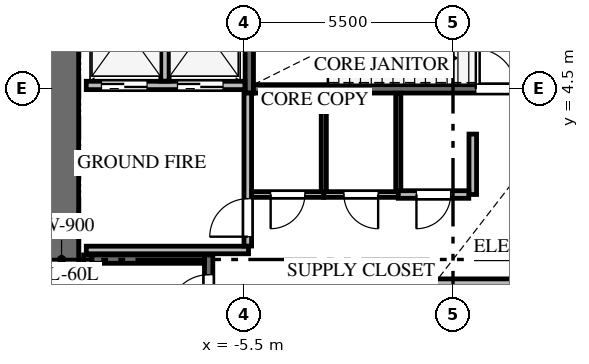
"""IFC4 building model, lengths in metres.
Left out: names, types, materials, properties, quantities, classifications, styles, units other than length and angle.
Written with IfcOpenShell. Run it as: python <this file> out.ifc"""

import sys

from ifc_helpers import new_model, si_unit, direction, frame, frame_2d, origin, place, context, subcontext, project, spatial, rectangle, extrude, source, transform, mapped, element, fill, save


model = new_model("IFC4")
c1 = context("Model", 3, precision=1e-05, world=origin(), true_north=direction((0.0, 1.0)))
c2 = subcontext(c1, "Body", "Model", "MODEL_VIEW")
j1 = project(units=[si_unit("LENGTHUNIT", "METRE"), si_unit("PLANEANGLEUNIT", "RADIAN")], contexts=[c1])
p1 = place(None, origin())
s1 = spatial("IfcSite", under=j1, at=p1, CompositionType="ELEMENT")
p2 = place(p1, origin())
s2 = spatial("IfcBuilding", under=s1, at=p2, CompositionType="ELEMENT")
p3 = place(p2, origin())
s3 = spatial("IfcBuildingStorey", under=s2, at=p3, CompositionType="ELEMENT", Elevation=0.0)
p4 = place(p3, frame((-10.3, -8.75, 0.0), z_axis=(0.0, 0.0, 1.0), x_axis=(0.0, 1.0, 0.0)))
e1 = element("IfcWall", 1, at=p4, inside=s3, PredefinedType="SHEAR", context=c2, shape_type="SweptSolid", body=[
    extrude(rectangle(XDim=17.5, YDim=0.9, at=frame_2d((8.75, 0.0))), origin(), (0.0, 0.0, 1.0), 5.2),
])
p5 = place(p3, frame((-6.43, -7.77, -0.3), z_axis=(0.0, 0.0, 1.0), x_axis=(0.0, 1.0, 0.0)))
e2 = element("IfcWall", 2, at=p5, inside=s3, PredefinedType="SHEAR", context=c2, shape_type="SweptSolid", body=[
    extrude(rectangle(XDim=7.89, YDim=0.22, at=frame_2d((3.945, 0.0))), origin(), (0.0, 0.0, 1.0), 5.2),
])
p6 = place(p5, frame((6.32, 0.0, 0.0)))
e3 = element("IfcOpeningElement", 3, at=p6, cuts=e2, PredefinedType="OPENING", context=c2, shape_type="SweptSolid", body=[
    extrude(rectangle(XDim=1.05, YDim=2.15, at=frame_2d((0.525, 1.075))), frame((0.0, 0.12, 0.0), z_axis=(0.0, -1.0, 0.0), x_axis=(1.0, 0.0, 0.0)), (0.0, 0.0, 1.0), 0.24),
])
p7 = place(p3, frame((-9.61, 0.12, -0.3), z_axis=(0.0, 0.0, 1.0), x_axis=(0.0, -1.0, 0.0)))
e4 = element("IfcWall", 4, at=p7, inside=s3, PredefinedType="SHEAR", context=c2, shape_type="SweptSolid", body=[
    extrude(rectangle(XDim=7.89, YDim=0.22, at=frame_2d((3.945, 0.0))), origin(), (0.0, 0.0, 1.0), 5.2),
])
p8 = place(p3, frame((-6.54, 0.01, -0.3), z_axis=(0.0, 0.0, 1.0), x_axis=(-1.0, 0.0, 0.0)))
e5 = element("IfcWall", 5, at=p8, inside=s3, PredefinedType="SHEAR", context=c2, shape_type="SweptSolid", body=[
    extrude(rectangle(XDim=2.96, YDim=0.22, at=frame_2d((1.48, 0.0))), origin(), (0.0, 0.0, 1.0), 5.2),
])
p9 = place(p3, frame((-5.36, 7.78, -0.3), z_axis=(0.0, 0.0, 1.0), x_axis=(0.0, -1.0, 0.0)))
e6 = element("IfcWall", 6, at=p9, inside=s3, PredefinedType="SHEAR", context=c2, shape_type="SweptSolid", body=[
    extrude(rectangle(XDim=3.4, YDim=0.22, at=frame_2d((1.7, 0.0))), origin(), (0.0, 0.0, 1.0), 5.2),
])
p10 = place(p3, frame((-5.25, 4.49, -0.3), z_axis=(0.0, 0.0, 1.0), x_axis=(1.0, 0.0, 0.0)))
e7 = element("IfcWall", 7, at=p10, inside=s3, PredefinedType="SHEAR", context=c2, shape_type="SweptSolid", body=[
    extrude(rectangle(XDim=7.35, YDim=0.22, at=frame_2d((3.675, 0.0))), origin(), (0.0, 0.0, 1.0), 5.2),
])
p11 = place(p10, frame((5.85, 0.0, 0.0)))
e8 = element("IfcOpeningElement", 8, at=p11, cuts=e7, PredefinedType="OPENING", context=c2, shape_type="SweptSolid", body=[
    extrude(rectangle(XDim=1.05, YDim=2.15, at=frame_2d((0.525, 1.075))), frame((0.0, 0.12, 0.0), z_axis=(0.0, -1.0, 0.0), x_axis=(1.0, 0.0, 0.0)), (0.0, 0.0, 1.0), 0.24),
])
p12 = place(p3, frame((-20.589, 1.538, 0.0), z_axis=(0.0, 0.0, 1.0), x_axis=(0.603015201292, 0.797729695455, 0.0)))
e9 = element("IfcWall", 9, at=p12, inside=s3, PredefinedType="SOLIDWALL", context=c2, shape_type="SweptSolid", body=[
    extrude(rectangle(XDim=16.65, YDim=0.3, at=frame_2d((8.325, 0.0))), origin(), (0.0, 0.0, 1.0), 4.9),
])
p13 = place(p12, frame((2.0, 0.0, 0.0)))
e10 = element("IfcOpeningElement", 10, at=p13, cuts=e9, PredefinedType="OPENING", context=c2, shape_type="SweptSolid", body=[
    extrude(rectangle(XDim=1.05, YDim=2.2, at=frame_2d((0.525, 1.1))), frame((0.0, 0.16, 0.0), z_axis=(0.0, -1.0, 0.0), x_axis=(1.0, 0.0, 0.0)), (0.0, 0.0, 1.0), 0.32),
])
p14 = place(p3, frame((-9.65, 4.58, 0.0), z_axis=(0.0, 0.0, 1.0), x_axis=(1.0, 0.0, 0.0)))
e11 = element("IfcWall", 11, at=p14, inside=s3, PredefinedType="SOLIDWALL", context=c2, shape_type="SweptSolid", body=[
    extrude(rectangle(XDim=4.175, YDim=0.22, at=frame_2d((2.087, 0.0))), origin(), (0.0, 0.0, 1.0), 4.885),
])
p15 = place(p14, frame((0.4, 0.0, 0.0)))
e12 = element("IfcOpeningElement", 12, at=p15, cuts=e11, PredefinedType="OPENING", context=c2, shape_type="SweptSolid", body=[
    extrude(rectangle(XDim=1.2, YDim=2.15, at=frame_2d((0.6, 1.075))), frame((0.0, 0.12, 0.0), z_axis=(0.0, -1.0, 0.0), x_axis=(1.0, 0.0, 0.0)), (0.0, 0.0, 1.0), 0.24),
])
p16 = place(p14, frame((2.4, 0.0, 0.0)))
e13 = element("IfcOpeningElement", 13, at=p16, cuts=e11, PredefinedType="OPENING", context=c2, shape_type="SweptSolid", body=[
    extrude(rectangle(XDim=1.2, YDim=2.15, at=frame_2d((0.6, 1.075))), frame((0.0, 0.12, 0.0), z_axis=(0.0, -1.0, 0.0), x_axis=(1.0, 0.0, 0.0)), (0.0, 0.0, 1.0), 0.24),
])
p17 = place(p3, frame((-7.58, 4.694, 0.0), z_axis=(0.0, 0.0, 1.0), x_axis=(0.0, 1.0, 0.0)))
e14 = element("IfcWall", 14, at=p17, inside=s3, PredefinedType="SOLIDWALL", context=c2, shape_type="SweptSolid", body=[
    extrude(rectangle(XDim=2.906, YDim=0.22, at=frame_2d((1.453, 0.0))), origin(), (0.0, 0.0, 1.0), 4.885),
])
p18 = place(p3, frame((-9.65, 0.25, 0.0), z_axis=(0.0, 0.0, 1.0), x_axis=(1.0, 0.0, 0.0)))
e15 = element("IfcWall", 15, at=p18, inside=s3, PredefinedType="SOLIDWALL", context=c2, shape_type="SweptSolid", body=[
    extrude(rectangle(XDim=4.27, YDim=0.2, at=frame_2d((2.135, 0.0))), origin(), (0.0, 0.0, 1.0), 4.885),
])
p19 = place(p3, frame((-5.4, 0.354, 0.0), z_axis=(0.0, 0.0, 1.0), x_axis=(0.0, 1.0, 0.0)))
e16 = element("IfcWall", 16, at=p19, inside=s3, PredefinedType="SOLIDWALL", context=c2, shape_type="SweptSolid", body=[
    extrude(rectangle(XDim=4.026, YDim=0.2, at=frame_2d((2.013, 0.0))), origin(), (0.0, 0.0, 1.0), 4.885),
])
p20 = place(p19, frame((0.246, 0.0, 0.0)))
e17 = element("IfcOpeningElement", 17, at=p20, cuts=e16, PredefinedType="OPENING", context=c2, shape_type="SweptSolid", body=[
    extrude(rectangle(XDim=1.0, YDim=2.15, at=frame_2d((0.5, 1.075))), frame((0.0, 0.11, 0.0), z_axis=(0.0, -1.0, 0.0), x_axis=(1.0, 0.0, 0.0)), (0.0, 0.0, 1.0), 0.22),
])
p21 = place(p3, frame((-4.22, -0.62, 0.0), z_axis=(0.0, 0.0, 1.0), x_axis=(1.0, 0.0, 0.0)))
e18 = element("IfcWall", 18, at=p21, inside=s3, PredefinedType="SOLIDWALL", context=c2, shape_type="SweptSolid", body=[
    extrude(rectangle(XDim=7.24, YDim=0.22, at=frame_2d((3.62, 0.0))), origin(), (0.0, 0.0, 1.0), 4.885),
])
p22 = place(p3, frame((-3.4, 1.71, 0.0), z_axis=(0.0, 0.0, 1.0), x_axis=(-1.0, 0.0, 0.0)))
e19 = element("IfcWall", 19, at=p22, inside=s3, PredefinedType="PARTITIONING", context=c2, shape_type="SweptSolid", body=[
    extrude(rectangle(XDim=1.896, YDim=0.15, at=frame_2d((0.948, 0.0))), origin(), (0.0, 0.0, 1.0), 4.885),
])
p23 = place(p22, frame((0.498, 0.0, 0.0)))
e20 = element("IfcOpeningElement", 20, at=p23, cuts=e19, PredefinedType="OPENING", context=c2, shape_type="SweptSolid", body=[
    extrude(rectangle(XDim=0.9, YDim=2.05, at=frame_2d((0.45, 1.025))), frame((0.0, 0.085, 0.0), z_axis=(0.0, -1.0, 0.0), x_axis=(1.0, 0.0, 0.0)), (0.0, 0.0, 1.0), 0.17),
])
p24 = place(p3, frame((-1.44, 1.71, 0.0), z_axis=(0.0, 0.0, 1.0), x_axis=(-1.0, 0.0, 0.0)))
e21 = element("IfcWall", 21, at=p24, inside=s3, PredefinedType="PARTITIONING", context=c2, shape_type="SweptSolid", body=[
    extrude(rectangle(XDim=1.96, YDim=0.15, at=frame_2d((0.98, 0.0))), origin(), (0.0, 0.0, 1.0), 4.885),
])
p25 = place(p24, frame((0.53, 0.0, 0.0)))
e22 = element("IfcOpeningElement", 22, at=p25, cuts=e21, PredefinedType="OPENING", context=c2, shape_type="SweptSolid", body=[
    extrude(rectangle(XDim=0.9, YDim=2.05, at=frame_2d((0.45, 1.025))), frame((0.0, 0.085, 0.0), z_axis=(0.0, -1.0, 0.0), x_axis=(1.0, 0.0, 0.0)), (0.0, 0.0, 1.0), 0.17),
])
p26 = place(p3, frame((0.52, 3.3, 0.0), z_axis=(0.0, 0.0, 1.0), x_axis=(0.0, -1.0, 0.0)))
e23 = element("IfcWall", 23, at=p26, inside=s3, PredefinedType="SOLIDWALL", context=c2, shape_type="SweptSolid", body=[
    extrude(rectangle(XDim=1.59, YDim=0.2, at=frame_2d((0.795, 0.0))), origin(), (0.0, 0.0, 1.0), 4.885),
])
p27 = place(p3, frame((0.416, 1.71, 0.0), z_axis=(0.0, 0.0, 1.0), x_axis=(-1.0, 0.0, 0.0)))
e24 = element("IfcWall", 24, at=p27, inside=s3, PredefinedType="SOLIDWALL", context=c2, shape_type="SweptSolid", body=[
    extrude(rectangle(XDim=1.856, YDim=0.2, at=frame_2d((0.928, 0.0))), origin(), (0.0, 0.0, 1.0), 4.885),
])
p28 = place(p27, frame((0.478, 0.0, 0.0)))
e25 = element("IfcOpeningElement", 25, at=p28, cuts=e24, PredefinedType="OPENING", context=c2, shape_type="SweptSolid", body=[
    extrude(rectangle(XDim=0.9, YDim=2.05, at=frame_2d((0.45, 1.025))), frame((0.0, 0.11, 0.0), z_axis=(0.0, -1.0, 0.0), x_axis=(1.0, 0.0, 0.0)), (0.0, 0.0, 1.0), 0.22),
])
p29 = place(p3, frame((-3.4, 4.375, 0.0), z_axis=(0.0, 0.0, 1.0), x_axis=(0.0, -1.0, 0.0)))
e26 = element("IfcWall", 26, at=p29, inside=s3, PredefinedType="PARTITIONING", context=c2, shape_type="SweptSolid", body=[
    extrude(rectangle(XDim=2.586, YDim=0.135, at=frame_2d((1.293, 0.0))), origin(), (0.0, 0.0, 1.0), 4.885),
])
p30 = place(p3, frame((-1.44, 4.375, 0.0), z_axis=(0.0, 0.0, 1.0), x_axis=(0.0, -1.0, 0.0)))
e27 = element("IfcWall", 27, at=p30, inside=s3, PredefinedType="PARTITIONING", context=c2, shape_type="SweptSolid", body=[
    extrude(rectangle(XDim=2.561, YDim=0.135, at=frame_2d((1.281, 0.0))), origin(), (0.0, 0.0, 1.0), 4.885),
])
m1 = source(origin(), c2, "Body", "SweptSolid", [
    extrude(rectangle(XDim=1.05, YDim=2.15, at=frame_2d((0.525, 1.075))), frame((0.0, 0.025, 0.0), z_axis=(0.0, -1.0, 0.0), x_axis=(1.0, 0.0, 0.0)), (0.0, 0.0, 1.0), 0.05),
])
p31 = place(p6, origin())
e28 = element("IfcDoor", 28, at=p31, inside=s3, OperationType="SINGLE_SWING_LEFT", PredefinedType="DOOR", context=c2, shape_type="MappedRepresentation", body=[
    mapped(m1, transform((0.0, 0.0, 0.0), x_axis=(1.0, 0.0, 0.0), y_axis=(0.0, 1.0, 0.0), z_axis=(0.0, 0.0, 1.0), scale=1.0)),
])
fill(e3, e28)
p32 = place(p11, origin())
e29 = element("IfcDoor", 29, at=p32, inside=s3, OperationType="SINGLE_SWING_LEFT", PredefinedType="DOOR", context=c2, shape_type="MappedRepresentation", body=[
    mapped(m1, transform((0.0, 0.0, 0.0), x_axis=(1.0, 0.0, 0.0), y_axis=(0.0, 1.0, 0.0), z_axis=(0.0, 0.0, 1.0), scale=1.0)),
])
fill(e8, e29)
m2 = source(origin(), c2, "Body", "SweptSolid", [
    extrude(rectangle(XDim=1.2, YDim=2.15, at=frame_2d((0.6, 1.075))), frame((0.0, 0.025, 0.0), z_axis=(0.0, -1.0, 0.0), x_axis=(1.0, 0.0, 0.0)), (0.0, 0.0, 1.0), 0.05),
])
p33 = place(p15, origin())
e30 = element("IfcDoor", 30, at=p33, inside=s3, OperationType="DOUBLE_DOOR_SLIDING", PredefinedType="DOOR", context=c2, shape_type="MappedRepresentation", body=[
    mapped(m2, transform((0.0, 0.0, 0.0), x_axis=(1.0, 0.0, 0.0), y_axis=(0.0, 1.0, 0.0), z_axis=(0.0, 0.0, 1.0), scale=1.0)),
])
fill(e12, e30)
p34 = place(p16, origin())
e31 = element("IfcDoor", 31, at=p34, inside=s3, OperationType="DOUBLE_DOOR_SLIDING", PredefinedType="DOOR", context=c2, shape_type="MappedRepresentation", body=[
    mapped(m2, transform((0.0, 0.0, 0.0), x_axis=(1.0, 0.0, 0.0), y_axis=(0.0, 1.0, 0.0), z_axis=(0.0, 0.0, 1.0), scale=1.0)),
])
fill(e13, e31)
m3 = source(origin(), c2, "Body", "SweptSolid", [
    extrude(rectangle(XDim=1.0, YDim=2.15, at=frame_2d((0.5, 1.075))), frame((0.0, 0.025, 0.0), z_axis=(0.0, -1.0, 0.0), x_axis=(1.0, 0.0, 0.0)), (0.0, 0.0, 1.0), 0.05),
])
p35 = place(p20, origin())
e32 = element("IfcDoor", 32, at=p35, inside=s3, OperationType="SINGLE_SWING_LEFT", PredefinedType="DOOR", context=c2, shape_type="MappedRepresentation", body=[
    mapped(m3, transform((0.0, 0.0, 0.0), x_axis=(1.0, 0.0, 0.0), y_axis=(0.0, 1.0, 0.0), z_axis=(0.0, 0.0, 1.0), scale=1.0)),
])
fill(e17, e32)
m4 = source(origin(), c2, "Body", "SweptSolid", [
    extrude(rectangle(XDim=0.9, YDim=2.05, at=frame_2d((0.45, 1.025))), frame((0.0, 0.025, 0.0), z_axis=(0.0, -1.0, 0.0), x_axis=(1.0, 0.0, 0.0)), (0.0, 0.0, 1.0), 0.05),
])
p36 = place(p23, origin())
e33 = element("IfcDoor", 33, at=p36, inside=s3, OperationType="SINGLE_SWING_RIGHT", PredefinedType="DOOR", context=c2, shape_type="MappedRepresentation", body=[
    mapped(m4, transform((0.0, 0.0, 0.0), x_axis=(1.0, 0.0, 0.0), y_axis=(0.0, 1.0, 0.0), z_axis=(0.0, 0.0, 1.0), scale=1.0)),
])
fill(e20, e33)
m5 = source(origin(), c2, "Body", "SweptSolid", [
    extrude(rectangle(XDim=0.9, YDim=2.05, at=frame_2d((0.45, 1.025))), frame((0.0, 0.025, 0.0), z_axis=(0.0, -1.0, 0.0), x_axis=(1.0, 0.0, 0.0)), (0.0, 0.0, 1.0), 0.05),
])
p37 = place(p25, origin())
e34 = element("IfcDoor", 34, at=p37, inside=s3, OperationType="SINGLE_SWING_LEFT", PredefinedType="DOOR", context=c2, shape_type="MappedRepresentation", body=[
    mapped(m5, transform((0.0, 0.0, 0.0), x_axis=(1.0, 0.0, 0.0), y_axis=(0.0, 1.0, 0.0), z_axis=(0.0, 0.0, 1.0), scale=1.0)),
])
fill(e22, e34)
p38 = place(p28, origin())
e35 = element("IfcDoor", 35, at=p38, inside=s3, OperationType="SINGLE_SWING_RIGHT", PredefinedType="DOOR", context=c2, shape_type="MappedRepresentation", body=[
    mapped(m4, transform((0.0, 0.0, 0.0), x_axis=(1.0, 0.0, 0.0), y_axis=(0.0, 1.0, 0.0), z_axis=(0.0, 0.0, 1.0), scale=1.0)),
])
fill(e25, e35)
save(model, sys.argv[1])
